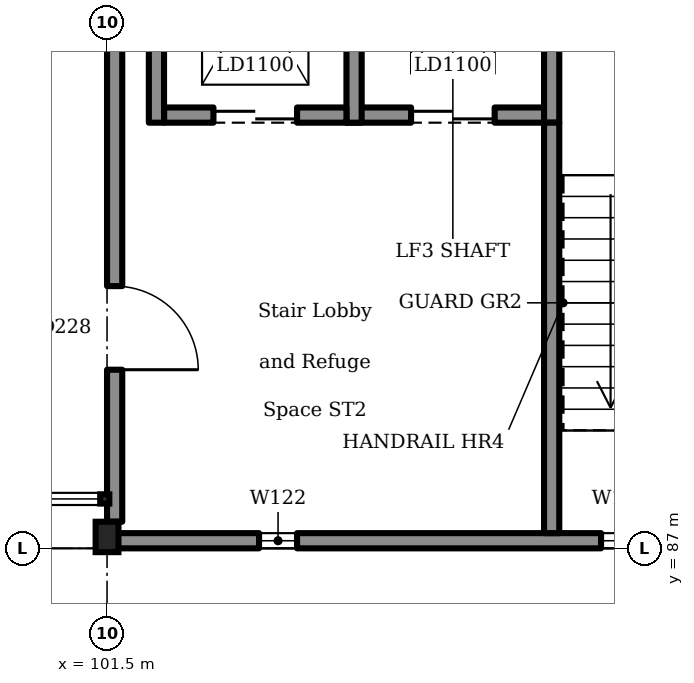
"""IFC4 building model, lengths in metres.
Left out: names, types, materials, properties, quantities, classifications, styles, units other than length and angle.
Written with IfcOpenShell. Run it as: python <this file> out.ifc"""

import sys

from ifc_helpers import new_model, si_unit, direction, frame, frame_2d, origin, origin_2d, place, context, subcontext, project, spatial, rectangle, i_section, extrude, element, fill, save


model = new_model("IFC4")
c1 = context("Model", 3, precision=1e-05, world=origin(), true_north=direction((0.0, 1.0)))
c2 = subcontext(c1, "Body", "Model", "MODEL_VIEW")
j1 = project(units=[si_unit("LENGTHUNIT", "METRE"), si_unit("PLANEANGLEUNIT", "RADIAN")], contexts=[c1])
p1 = place(None, origin())
s1 = spatial("IfcSite", under=j1, at=p1, CompositionType="ELEMENT")
p2 = place(p1, origin())
s2 = spatial("IfcBuilding", under=s1, at=p2, CompositionType="ELEMENT")
p3 = place(p2, frame((0.0, 0.0, 9.9)))
s3 = spatial("IfcBuildingStorey", under=s2, at=p3, CompositionType="ELEMENT", Elevation=9.9)
p4 = place(p3, frame((104.65, 92.7, 0.0), z_axis=(0.0, 0.0, 1.0), x_axis=(1.0, 0.0, 0.0)))
e1 = element("IfcWall", 1, at=p4, inside=s3, PredefinedType="SOLIDWALL", context=c2, shape_type="SweptSolid", body=[
    extrude(rectangle(XDim=2.6, YDim=0.2, at=frame_2d((1.3, 0.0))), origin(), (0.0, 0.0, 1.0), 4.5),
])
p5 = place(p4, frame((0.85, 0.0, 0.0)))
e2 = element("IfcOpeningElement", 2, at=p5, cuts=e1, PredefinedType="OPENING", context=c2, shape_type="SweptSolid", body=[
    extrude(rectangle(XDim=1.1, YDim=2.1, at=frame_2d((0.55, 1.05))), frame((0.0, 0.11, 0.0), z_axis=(0.0, -1.0, 0.0), x_axis=(1.0, 0.0, 0.0)), (0.0, 0.0, 1.0), 0.22),
])
for number, where, z_axis, x_axis in (
    (3, (104.75, 92.6, 0.0), (0.0, 0.0, 1.0), (0.0, 1.0, 0.0)),
    (4, (107.35, 92.6, 0.0), (0.0, 0.0, 1.0), (0.0, 1.0, 0.0)),
):
    element("IfcWall", number, at=place(p3, frame(where, z_axis=z_axis, x_axis=x_axis)), inside=s3, PredefinedType="SOLIDWALL", context=c2, shape_type="SweptSolid", body=[
        extrude(rectangle(XDim=3.4, YDim=0.2, at=frame_2d((1.7, 0.0))), origin(), (0.0, 0.0, 1.0), 4.5),
    ])
p6 = place(p3, frame((102.25, 92.7, 0.0), z_axis=(0.0, 0.0, 1.0), x_axis=(1.0, 0.0, 0.0)))
e5 = element("IfcWall", 5, at=p6, inside=s3, PredefinedType="SOLIDWALL", context=c2, shape_type="SweptSolid", body=[
    extrude(rectangle(XDim=2.4, YDim=0.2, at=frame_2d((1.2, 0.0))), origin(), (0.0, 0.0, 1.0), 4.5),
])
p7 = place(p6, frame((0.65, 0.0, 0.0)))
e6 = element("IfcOpeningElement", 6, at=p7, cuts=e5, PredefinedType="OPENING", context=c2, shape_type="SweptSolid", body=[
    extrude(rectangle(XDim=1.1, YDim=2.1, at=frame_2d((0.55, 1.05))), frame((0.0, 0.11, 0.0), z_axis=(0.0, -1.0, 0.0), x_axis=(1.0, 0.0, 0.0)), (0.0, 0.0, 1.0), 0.22),
])
p8 = place(p3, frame((102.15, 92.6, 0.0), z_axis=(0.0, 0.0, 1.0), x_axis=(0.0, 1.0, 0.0)))
e7 = element("IfcWall", 7, at=p8, inside=s3, PredefinedType="SOLIDWALL", context=c2, shape_type="SweptSolid", body=[
    extrude(rectangle(XDim=3.4, YDim=0.2, at=frame_2d((1.7, 0.0))), origin(), (0.0, 0.0, 1.0), 4.5),
])
p9 = place(p3, frame((101.5, 87.15, 0.0), z_axis=(0.0, 0.0, 1.0), x_axis=(1.0, 0.0, 0.0)))
e8 = element("IfcColumn", 8, at=p9, inside=s3, PredefinedType="COLUMN", context=c2, shape_type="SweptSolid", body=[
    extrude(i_section(OverallWidth=0.3, OverallDepth=0.4, WebThickness=0.013, FlangeThickness=0.024, FilletRadius=0.027, at=origin_2d()), origin(), (0.0, 0.0, 1.0), 4.5),
])
p10 = place(p3, frame((101.6, 87.35, 0.0), z_axis=(0.0, 0.0, 1.0), x_axis=(0.0, 1.0, 0.0)))
e9 = element("IfcWall", 9, at=p10, inside=s3, PredefinedType="SOLIDWALL", context=c2, shape_type="SweptSolid", body=[
    extrude(rectangle(XDim=8.45, YDim=0.2, at=frame_2d((4.225, 0.0))), origin(), (0.0, 0.0, 1.0), 4.35),
])
p11 = place(p10, frame((2.0, 0.0, 0.0)))
e10 = element("IfcOpeningElement", 10, at=p11, cuts=e9, PredefinedType="OPENING", context=c2, shape_type="SweptSolid", body=[
    extrude(rectangle(XDim=1.1, YDim=2.1, at=frame_2d((0.55, 1.05))), frame((0.0, 0.11, 0.0), z_axis=(0.0, -1.0, 0.0), x_axis=(1.0, 0.0, 0.0)), (0.0, 0.0, 1.0), 0.22),
])
p12 = place(p3, frame((101.511, 87.1, 0.0), z_axis=(0.0, 0.0, 1.0), x_axis=(1.0, 0.0, 0.0)))
e11 = element("IfcWall", 11, at=p12, inside=s3, PredefinedType="SOLIDWALL", context=c2, shape_type="SweptSolid", body=[
    extrude(rectangle(XDim=8.978, YDim=0.2, at=frame_2d((4.489, 0.0))), origin(), (0.0, 0.0, 1.0), 4.35),
])
p13 = place(p12, frame((1.989, 0.0, 2.9)))
e12 = element("IfcOpeningElement", 12, at=p13, cuts=e11, PredefinedType="OPENING", context=c2, shape_type="SweptSolid", body=[
    extrude(rectangle(XDim=0.5, YDim=1.2, at=frame_2d((0.25, 0.6))), frame((0.0, 0.11, 0.0), z_axis=(0.0, -1.0, 0.0), x_axis=(1.0, 0.0, 0.0)), (0.0, 0.0, 1.0), 0.22),
])
p14 = place(p12, frame((6.489, 0.0, 2.9)))
e13 = element("IfcOpeningElement", 13, at=p14, cuts=e11, PredefinedType="OPENING", context=c2, shape_type="SweptSolid", body=[
    extrude(rectangle(XDim=0.5, YDim=1.2, at=frame_2d((0.25, 0.6))), frame((0.0, 0.11, 0.0), z_axis=(0.0, -1.0, 0.0), x_axis=(1.0, 0.0, 0.0)), (0.0, 0.0, 1.0), 0.22),
])
p15 = place(p3, frame((107.35, 87.2, 0.0), z_axis=(0.0, 0.0, 1.0), x_axis=(0.0, 1.0, 0.0)))
e14 = element("IfcWall", 14, at=p15, inside=s3, PredefinedType="SOLIDWALL", context=c2, shape_type="SweptSolid", body=[
    extrude(rectangle(XDim=5.4, YDim=0.2, at=frame_2d((2.7, 0.0))), origin(), (0.0, 0.0, 1.0), 4.35),
])
p16 = place(p5, origin())
e15 = element("IfcDoor", 15, at=p16, inside=s3, OperationType="SLIDING_TO_LEFT", PredefinedType="DOOR", context=c2, shape_type="SweptSolid", body=[
    extrude(rectangle(XDim=1.1, YDim=2.1, at=frame_2d((0.55, 1.05))), frame((0.0, 0.025, 0.0), z_axis=(0.0, -1.0, 0.0), x_axis=(1.0, 0.0, 0.0)), (0.0, 0.0, 1.0), 0.05),
])
fill(e2, e15)
p17 = place(p7, origin())
e16 = element("IfcDoor", 16, at=p17, inside=s3, OperationType="SLIDING_TO_LEFT", PredefinedType="DOOR", context=c2, shape_type="SweptSolid", body=[
    extrude(rectangle(XDim=1.1, YDim=2.1, at=frame_2d((0.55, 1.05))), frame((0.0, 0.025, 0.0), z_axis=(0.0, -1.0, 0.0), x_axis=(1.0, 0.0, 0.0)), (0.0, 0.0, 1.0), 0.05),
])
fill(e6, e16)
p18 = place(p13, origin())
e17 = element("IfcWindow", 17, at=p18, inside=s3, PartitioningType="SINGLE_PANEL", PredefinedType="WINDOW", context=c2, shape_type="SweptSolid", body=[
    extrude(rectangle(XDim=0.5, YDim=1.2, at=frame_2d((0.25, 0.6))), frame((0.0, 0.03, 0.0), z_axis=(0.0, -1.0, 0.0), x_axis=(1.0, 0.0, 0.0)), (0.0, 0.0, 1.0), 0.06),
])
fill(e12, e17)
p19 = place(p14, origin())
e18 = element("IfcWindow", 18, at=p19, inside=s3, PartitioningType="SINGLE_PANEL", PredefinedType="WINDOW", context=c2, shape_type="SweptSolid", body=[
    extrude(rectangle(XDim=0.5, YDim=1.2, at=frame_2d((0.25, 0.6))), frame((0.0, 0.03, 0.0), z_axis=(0.0, -1.0, 0.0), x_axis=(1.0, 0.0, 0.0)), (0.0, 0.0, 1.0), 0.06),
])
fill(e13, e18)
p20 = place(p11, frame((1.1, 0.0, 0.0), z_axis=(0.0, 0.0, 1.0), x_axis=(-1.0, 0.0, 0.0)))
e19 = element("IfcDoor", 19, at=p20, inside=s3, OperationType="SINGLE_SWING_LEFT", PredefinedType="DOOR", context=c2, shape_type="SweptSolid", body=[
    extrude(rectangle(XDim=1.1, YDim=2.1, at=frame_2d((0.55, 1.05))), frame((0.0, 0.025, 0.0), z_axis=(0.0, -1.0, 0.0), x_axis=(1.0, 0.0, 0.0)), (0.0, 0.0, 1.0), 0.05),
])
fill(e10, e19)
save(model, sys.argv[1])
